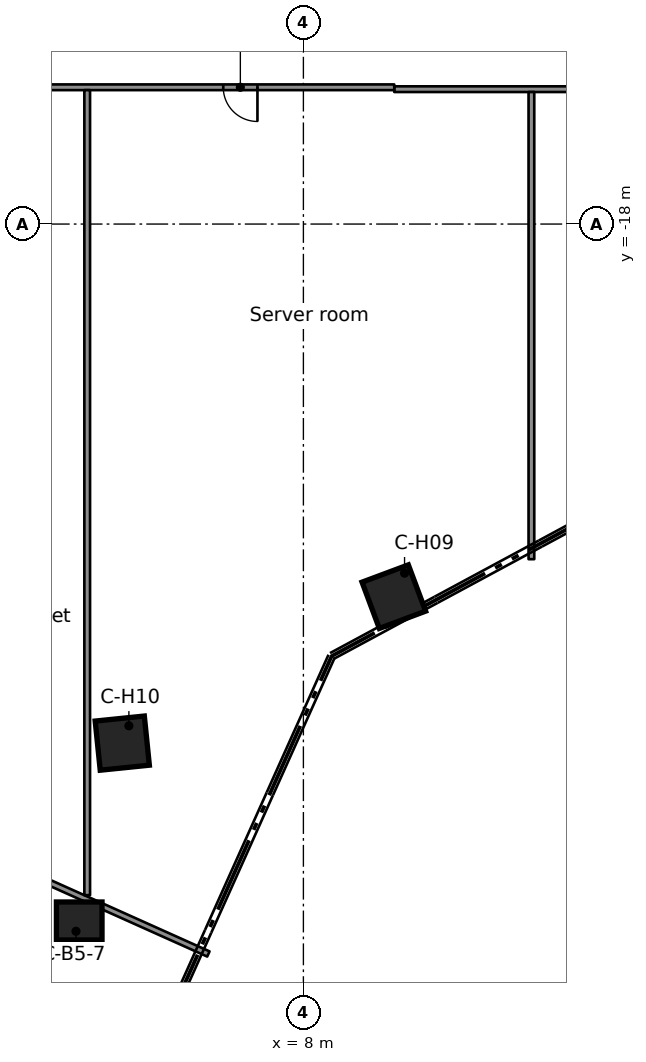
"""IFC4 building model, lengths in metres.
Left out: names, types, materials, properties, quantities, classifications, styles, units other than length and angle.
Written with IfcOpenShell. Run it as: python <this file> out.ifc"""

import sys

from ifc_helpers import new_model, si_unit, direction, frame, frame_2d, origin, origin_2d, place, context, subcontext, project, spatial, rectangle, extrude, element, fill, save


model = new_model("IFC4")
c1 = context("Model", 3, precision=1e-05, world=origin(), true_north=direction((0.0, 1.0)))
c2 = subcontext(c1, "Body", "Model", "MODEL_VIEW")
j1 = project(units=[si_unit("LENGTHUNIT", "METRE"), si_unit("PLANEANGLEUNIT", "RADIAN")], contexts=[c1])
p1 = place(None, origin())
s1 = spatial("IfcSite", under=j1, at=p1, CompositionType="ELEMENT")
p2 = place(p1, origin())
s2 = spatial("IfcBuilding", under=s1, at=p2, CompositionType="ELEMENT")
p3 = place(p2, frame((0.0, 0.0, 127.2)))
s3 = spatial("IfcBuildingStorey", under=s2, at=p3, CompositionType="ELEMENT", Elevation=127.2)
p4 = place(p3, frame((2.101, -36.338, 0.0), z_axis=(0.0, 0.0, 1.0), x_axis=(1.0, 0.0, 0.0)))
e1 = element("IfcColumn", 1, at=p4, inside=s3, PredefinedType="COLUMN", context=c2, shape_type="SweptSolid", body=[
    extrude(rectangle(XDim=1.2, YDim=1.0, at=origin_2d()), origin(), (0.0, 0.0, 1.0), 3.5),
])
for number, where, z_axis, x_axis in (
    (2, (10.38, -27.804, 0.0), (0.0, 0.0, 1.0), (0.35, -0.937, 0.0)),
    (3, (3.234, -31.658, 0.0), (0.0, 0.0, 1.0), (0.102, -0.995, 0.0)),
):
    element("IfcColumn", number, at=place(p3, frame(where, z_axis=z_axis, x_axis=x_axis)), inside=s3, PredefinedType="COLUMN", context=c2, shape_type="SweptSolid", body=[
        extrude(rectangle(XDim=1.3, YDim=1.3, at=origin_2d()), origin(), (0.0, 0.0, 1.0), 3.5),
    ])
p5 = place(p3, frame((-9.223, -36.248, 0.0), z_axis=(0.0, 0.0, 1.0), x_axis=(0.912391093054, -0.409319549149, 0.0)))
e4 = element("IfcWall", 4, at=p5, inside=s3, PredefinedType="PARTITIONING", context=c2, shape_type="SweptSolid", body=[
    extrude(rectangle(XDim=13.825, YDim=0.1, at=frame_2d((6.913, 0.0))), origin(), (0.0, 0.0, 1.0), 3.08),
])
p6 = place(p3, frame((-7.113, -31.546, 0.0), z_axis=(0.0, 0.0, 1.0), x_axis=(0.912346277005, -0.409419431432, 0.0)))
e5 = element("IfcWall", 5, at=p6, inside=s3, PredefinedType="PARTITIONING", context=c2, shape_type="SweptSolid", body=[
    extrude(rectangle(XDim=13.825, YDim=0.15, at=frame_2d((6.913, 0.0))), origin(), (0.0, 0.0, 1.0), 3.08),
])
p7 = place(p3, frame((21.387, -14.451, 0.0), z_axis=(0.0, 0.0, 1.0), x_axis=(-1.0, 0.0, 0.0)))
e6 = element("IfcWall", 6, at=p7, inside=s3, PredefinedType="PARTITIONING", context=c2, shape_type="SweptSolid", body=[
    extrude(rectangle(XDim=10.996, YDim=0.15, at=frame_2d((5.498, 0.0))), origin(), (0.0, 0.0, 1.0), 3.08),
])
p8 = place(p7, frame((3.288, 0.0, 0.0)))
e7 = element("IfcOpeningElement", 7, at=p8, cuts=e6, PredefinedType="OPENING", context=c2, shape_type="SweptSolid", body=[
    extrude(rectangle(XDim=0.9, YDim=2.1, at=frame_2d((0.45, 1.05))), frame((0.0, 0.085, 0.0), z_axis=(0.0, -1.0, 0.0), x_axis=(1.0, 0.0, 0.0)), (0.0, 0.0, 1.0), 0.17),
])
p9 = place(p3, frame((10.391, -14.401, 0.0), z_axis=(0.0, 0.0, 1.0), x_axis=(-1.0, 0.0, 0.0)))
e8 = element("IfcWall", 8, at=p9, inside=s3, PredefinedType="PARTITIONING", context=c2, shape_type="SweptSolid", body=[
    extrude(rectangle(XDim=16.096, YDim=0.15, at=frame_2d((8.048, 0.0))), origin(), (0.0, 0.0, 1.0), 3.08),
])
p10 = place(p9, frame((11.68, 0.0, 0.0)))
e9 = element("IfcOpeningElement", 9, at=p10, cuts=e8, PredefinedType="OPENING", context=c2, shape_type="SweptSolid", body=[
    extrude(rectangle(XDim=0.9, YDim=2.1, at=frame_2d((0.45, 1.05))), frame((0.0, 0.085, 0.0), z_axis=(0.0, -1.0, 0.0), x_axis=(1.0, 0.0, 0.0)), (0.0, 0.0, 1.0), 0.17),
])
p11 = place(p9, frame((3.6, 0.0, 0.0)))
e10 = element("IfcOpeningElement", 10, at=p11, cuts=e8, PredefinedType="OPENING", context=c2, shape_type="SweptSolid", body=[
    extrude(rectangle(XDim=0.9, YDim=2.1, at=frame_2d((0.45, 1.05))), frame((0.0, 0.085, 0.0), z_axis=(0.0, -1.0, 0.0), x_axis=(1.0, 0.0, 0.0)), (0.0, 0.0, 1.0), 0.17),
])
p12 = place(p3, frame((14.0, -26.818, 0.0), z_axis=(0.0, 0.0, 1.0), x_axis=(0.0, 1.0, 0.0)))
e11 = element("IfcWall", 11, at=p12, inside=s3, PredefinedType="PARTITIONING", context=c2, shape_type="SweptSolid", body=[
    extrude(rectangle(XDim=12.292, YDim=0.15, at=frame_2d((6.146, 0.0))), origin(), (0.0, 0.0, 1.0), 3.08),
])
p13 = place(p3, frame((2.311, -35.659, 0.0), z_axis=(0.0, 0.0, 1.0), x_axis=(0.0, 1.0, 0.0)))
e12 = element("IfcWall", 12, at=p13, inside=s3, PredefinedType="PARTITIONING", context=c2, shape_type="SweptSolid", body=[
    extrude(rectangle(XDim=21.183, YDim=0.15, at=frame_2d((10.591, 0.0))), origin(), (0.0, 0.0, 1.0), 3.08),
])
p14 = place(p11, origin())
e13 = element("IfcDoor", 13, at=p14, inside=s3, OperationType="SINGLE_SWING_LEFT", PredefinedType="DOOR", context=c2, shape_type="SweptSolid", body=[
    extrude(rectangle(XDim=0.9, YDim=2.1, at=frame_2d((0.45, 1.05))), frame((0.0, 0.025, 0.0), z_axis=(0.0, -1.0, 0.0), x_axis=(1.0, 0.0, 0.0)), (0.0, 0.0, 1.0), 0.05),
])
fill(e10, e13)
save(model, sys.argv[1])
